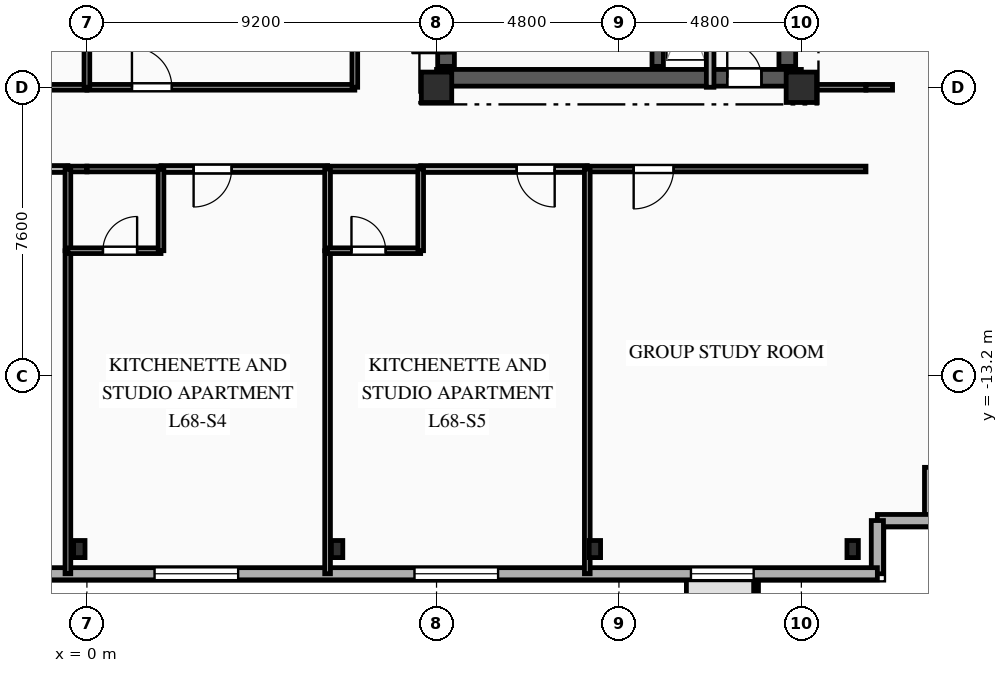
"""IFC4 building model, lengths in metres.
Left out: names, types, materials, properties, quantities, classifications, styles, units other than length and angle.
Written with IfcOpenShell. Run it as: python <this file> out.ifc"""

import sys

from ifc_helpers import new_model, si_unit, direction, frame, frame_2d, origin, origin_2d, place, context, subcontext, project, spatial, rectangle, i_section, extrude, element, fill, save


model = new_model("IFC4")
c1 = context("Model", 3, precision=1e-05, world=origin(), true_north=direction((0.0, 1.0)))
c2 = subcontext(c1, "Body", "Model", "MODEL_VIEW")
j1 = project(units=[si_unit("LENGTHUNIT", "METRE"), si_unit("PLANEANGLEUNIT", "RADIAN")], contexts=[c1])
p1 = place(None, origin())
s1 = spatial("IfcSite", under=j1, at=p1, CompositionType="ELEMENT")
p2 = place(p1, origin())
s2 = spatial("IfcBuilding", under=s1, at=p2, CompositionType="ELEMENT")
p3 = place(p2, frame((0.0, 0.0, 241.7)))
s3 = spatial("IfcBuildingStorey", under=s2, at=p3, CompositionType="ELEMENT", Elevation=241.7)
for number, where, z_axis, x_axis in (
    (1, (9.2, -5.6, 0.0), (0.0, 0.0, 1.0), (1.0, 0.0, 0.0)),
    (2, (18.8, -5.6, 0.0), (0.0, 0.0, 1.0), (1.0, 0.0, 0.0)),
):
    element("IfcColumn", number, at=place(p3, frame(where, z_axis=z_axis, x_axis=x_axis)), inside=s3, PredefinedType="COLUMN", context=c2, shape_type="SweptSolid", body=[
        extrude(rectangle(XDim=0.8, YDim=0.8, at=origin_2d()), origin(), (0.0, 0.0, 1.0), 3.35),
    ])
for number, where, z_axis, x_axis in (
    (3, (-0.2, -17.75, 0.0), (0.0, 0.0, 1.0), (1.0, 0.0, 0.0)),
    (4, (6.583, -17.75, 0.0), (0.0, 0.0, 1.0), (1.0, 0.0, 0.0)),
    (5, (13.367, -17.75, 0.0), (0.0, 0.0, 1.0), (1.0, 0.0, 0.0)),
    (6, (20.15, -17.75, 0.0), (0.0, 0.0, 1.0), (1.0, 0.0, 0.0)),
):
    element("IfcColumn", number, at=place(p3, frame(where, z_axis=z_axis, x_axis=x_axis)), inside=s3, PredefinedType="COLUMN", context=c2, shape_type="SweptSolid", body=[
        extrude(i_section(OverallWidth=0.3, OverallDepth=0.45, WebThickness=0.014, FlangeThickness=0.026, FilletRadius=0.027, at=origin_2d()), origin(), (0.0, 0.0, 1.0), 3.35),
    ])
for number, where, z_axis, x_axis in (
    (7, (22.2, -15.6, 0.0), (0.0, 0.0, 1.0), (0.0, -1.0, 0.0)),
    (8, (22.2, -17.0, 0.0), (0.0, 0.0, 1.0), (-1.0, 0.0, 0.0)),
    (9, (20.8, -17.0, 0.0), (0.0, 0.0, 1.0), (0.0, -1.0, 0.0)),
):
    element("IfcWall", number, at=place(p3, frame(where, z_axis=z_axis, x_axis=x_axis)), inside=s3, PredefinedType="SOLIDWALL", context=c2, shape_type="SweptSolid", body=[
        extrude(rectangle(XDim=1.4, YDim=0.32, at=frame_2d((0.7, 0.0))), origin(), (0.0, 0.0, 1.0), 3.04),
    ])
p4 = place(p3, frame((20.8, -18.4, 0.0), z_axis=(0.0, 0.0, 1.0), x_axis=(-1.0, 0.0, 0.0)))
e10 = element("IfcWall", 10, at=p4, inside=s3, PredefinedType="SOLIDWALL", context=c2, shape_type="SweptSolid", body=[
    extrude(rectangle(XDim=42.0, YDim=0.32, at=frame_2d((21.0, 0.0))), origin(), (0.0, 0.0, 1.0), 3.04),
])
p5 = place(p4, frame((3.255, 0.0, 0.85)))
e11 = element("IfcOpeningElement", 11, at=p5, cuts=e10, PredefinedType="OPENING", context=c2, shape_type="SweptSolid", body=[
    extrude(rectangle(XDim=1.65, YDim=1.85, at=frame_2d((0.825, 0.925))), frame((0.0, 0.17, 0.0), z_axis=(0.0, -1.0, 0.0), x_axis=(1.0, 0.0, 0.0)), (0.0, 0.0, 1.0), 0.34),
])
p6 = place(p4, frame((9.98, 0.0, 0.85)))
e12 = element("IfcOpeningElement", 12, at=p6, cuts=e10, PredefinedType="OPENING", context=c2, shape_type="SweptSolid", body=[
    extrude(rectangle(XDim=2.2, YDim=1.85, at=frame_2d((1.1, 0.925))), frame((0.0, 0.17, 0.0), z_axis=(0.0, -1.0, 0.0), x_axis=(1.0, 0.0, 0.0)), (0.0, 0.0, 1.0), 0.34),
])
p7 = place(p4, frame((16.82, 0.0, 0.85)))
e13 = element("IfcOpeningElement", 13, at=p7, cuts=e10, PredefinedType="OPENING", context=c2, shape_type="SweptSolid", body=[
    extrude(rectangle(XDim=2.2, YDim=1.85, at=frame_2d((1.1, 0.925))), frame((0.0, 0.17, 0.0), z_axis=(0.0, -1.0, 0.0), x_axis=(1.0, 0.0, 0.0)), (0.0, 0.0, 1.0), 0.34),
])
p8 = place(p4, frame((23.66, 0.0, 0.85)))
e14 = element("IfcOpeningElement", 14, at=p8, cuts=e10, PredefinedType="OPENING", context=c2, shape_type="SweptSolid", body=[
    extrude(rectangle(XDim=2.2, YDim=1.85, at=frame_2d((1.1, 0.925))), frame((0.0, 0.17, 0.0), z_axis=(0.0, -1.0, 0.0), x_axis=(1.0, 0.0, 0.0)), (0.0, 0.0, 1.0), 0.34),
])
p9 = place(p4, frame((30.5, 0.0, 0.85)))
e15 = element("IfcOpeningElement", 15, at=p9, cuts=e10, PredefinedType="OPENING", context=c2, shape_type="SweptSolid", body=[
    extrude(rectangle(XDim=2.2, YDim=1.85, at=frame_2d((1.1, 0.925))), frame((0.0, 0.17, 0.0), z_axis=(0.0, -1.0, 0.0), x_axis=(1.0, 0.0, 0.0)), (0.0, 0.0, 1.0), 0.34),
])
p10 = place(p4, frame((37.375, 0.0, 0.85)))
e16 = element("IfcOpeningElement", 16, at=p10, cuts=e10, PredefinedType="OPENING", context=c2, shape_type="SweptSolid", body=[
    extrude(rectangle(XDim=1.65, YDim=1.85, at=frame_2d((0.825, 0.925))), frame((0.0, 0.17, 0.0), z_axis=(0.0, -1.0, 0.0), x_axis=(1.0, 0.0, 0.0)), (0.0, 0.0, 1.0), 0.34),
])
p11 = place(p3, frame((9.2, -5.35, 0.0), z_axis=(0.0, 0.0, 1.0), x_axis=(1.0, 0.0, 0.0)))
e17 = element("IfcWall", 17, at=p11, inside=s3, PredefinedType="SHEAR", context=c2, shape_type="SweptSolid", body=[
    extrude(rectangle(XDim=9.6, YDim=0.44, at=frame_2d((4.8, 0.0))), origin(), (0.0, 0.0, 1.0), 3.04),
])
p12 = place(p11, frame((7.65, 0.0, 0.0)))
e18 = element("IfcOpeningElement", 18, at=p12, cuts=e17, PredefinedType="OPENING", context=c2, shape_type="SweptSolid", body=[
    extrude(rectangle(XDim=0.9, YDim=2.1, at=frame_2d((0.45, 1.05))), frame((0.0, 0.23, 0.0), z_axis=(0.0, -1.0, 0.0), x_axis=(1.0, 0.0, 0.0)), (0.0, 0.0, 1.0), 0.46),
])
p13 = place(p3, frame((9.45, -5.05, 0.0), z_axis=(0.0, 0.0, 1.0), x_axis=(0.0, 1.0, 0.0)))
e19 = element("IfcWall", 19, at=p13, inside=s3, PredefinedType="SHEAR", context=c2, shape_type="SweptSolid", body=[
    extrude(rectangle(XDim=10.1, YDim=0.44, at=frame_2d((5.05, 0.0))), origin(), (0.0, 0.0, 1.0), 3.04),
])
p14 = place(p13, frame((7.15, 0.0, 0.0)))
e20 = element("IfcOpeningElement", 20, at=p14, cuts=e19, PredefinedType="OPENING", context=c2, shape_type="SweptSolid", body=[
    extrude(rectangle(XDim=0.9, YDim=2.1, at=frame_2d((0.45, 1.05))), frame((0.0, 0.23, 0.0), z_axis=(0.0, -1.0, 0.0), x_axis=(1.0, 0.0, 0.0)), (0.0, 0.0, 1.0), 0.46),
])
p15 = place(p13, frame((2.4, 0.0, 0.0)))
e21 = element("IfcOpeningElement", 21, at=p15, cuts=e19, PredefinedType="OPENING", context=c2, shape_type="SweptSolid", body=[
    extrude(rectangle(XDim=1.2, YDim=2.15, at=frame_2d((0.6, 1.075))), frame((0.0, 0.23, 0.0), z_axis=(0.0, -1.0, 0.0), x_axis=(1.0, 0.0, 0.0)), (0.0, 0.0, 1.0), 0.46),
])
p16 = place(p13, frame((0.35, 0.0, 0.0)))
e22 = element("IfcOpeningElement", 22, at=p16, cuts=e19, PredefinedType="OPENING", context=c2, shape_type="SweptSolid", body=[
    extrude(rectangle(XDim=0.9, YDim=2.1, at=frame_2d((0.45, 1.05))), frame((0.0, 0.23, 0.0), z_axis=(0.0, -1.0, 0.0), x_axis=(1.0, 0.0, 0.0)), (0.0, 0.0, 1.0), 0.46),
])
p17 = place(p3, frame((18.43, -5.05, 0.0), z_axis=(0.0, 0.0, 1.0), x_axis=(0.0, 1.0, 0.0)))
e23 = element("IfcWall", 23, at=p17, inside=s3, PredefinedType="SHEAR", context=c2, shape_type="SweptSolid", body=[
    extrude(rectangle(XDim=10.1, YDim=0.44, at=frame_2d((5.05, 0.0))), origin(), (0.0, 0.0, 1.0), 3.04),
])
p18 = place(p3, frame((15.02, -5.05, 0.0), z_axis=(0.0, 0.0, 1.0), x_axis=(0.0, 1.0, 0.0)))
e24 = element("IfcWall", 24, at=p18, inside=s3, PredefinedType="SHEAR", context=c2, shape_type="SweptSolid", body=[
    extrude(rectangle(XDim=10.1, YDim=0.3, at=frame_2d((5.05, 0.0))), origin(), (0.0, 0.0, 1.0), 3.04),
])
p19 = place(p3, frame((16.4, -2.11, 0.0), z_axis=(0.0, 0.0, 1.0), x_axis=(0.0, -1.0, 0.0)))
e25 = element("IfcWall", 25, at=p19, inside=s3, PredefinedType="PARTITIONING", context=c2, shape_type="SweptSolid", body=[
    extrude(rectangle(XDim=3.49, YDim=0.2, at=frame_2d((1.745, 0.0))), origin(), (0.0, 0.0, 1.0), 3.04),
])
p20 = place(p3, frame((-0.5, -7.75, 0.0), z_axis=(0.0, 0.0, 1.0), x_axis=(-1.0, 0.0, 0.0)))
e26 = element("IfcWall", 26, at=p20, inside=s3, PredefinedType="PARTITIONING", context=c2, shape_type="SweptSolid", body=[
    extrude(rectangle(XDim=4.383, YDim=0.18, at=frame_2d((2.191, 0.0))), origin(), (0.0, 0.0, 1.0), 3.04),
])
p21 = place(p20, frame((0.858, 0.0, 0.0)))
e27 = element("IfcOpeningElement", 27, at=p21, cuts=e26, PredefinedType="OPENING", context=c2, shape_type="SweptSolid", body=[
    extrude(rectangle(XDim=1.0, YDim=2.15, at=frame_2d((0.5, 1.075))), frame((0.0, 0.1, 0.0), z_axis=(0.0, -1.0, 0.0), x_axis=(1.0, 0.0, 0.0)), (0.0, 0.0, 1.0), 0.2),
])
p22 = place(p3, frame((0.0, -7.75, 0.0), z_axis=(0.0, 0.0, 1.0), x_axis=(-1.0, 0.0, 0.0)))
e28 = element("IfcWall", 28, at=p22, inside=s3, PredefinedType="PLUMBINGWALL", context=c2, shape_type="SweptSolid", body=[
    extrude(rectangle(XDim=0.5, YDim=0.15, at=frame_2d((0.25, 0.0))), origin(), (0.0, 0.0, 1.0), 3.04),
])
p23 = place(p3, frame((-7.05, -5.6, 0.0), z_axis=(0.0, 0.0, 1.0), x_axis=(1.0, 0.0, 0.0)))
e29 = element("IfcWall", 29, at=p23, inside=s3, PredefinedType="PARTITIONING", context=c2, shape_type="SweptSolid", body=[
    extrude(rectangle(XDim=7.05, YDim=0.15, at=frame_2d((3.525, 0.0))), origin(), (0.0, 0.0, 1.0), 2.525),
])
p24 = place(p3, frame((18.8, -5.6, 0.0), z_axis=(0.0, 0.0, 1.0), x_axis=(1.0, 0.0, 0.0)))
e30 = element("IfcWall", 30, at=p24, inside=s3, PredefinedType="PARTITIONING", context=c2, shape_type="SweptSolid", body=[
    extrude(rectangle(XDim=1.7, YDim=0.15, at=frame_2d((0.85, 0.0))), origin(), (0.0, 0.0, 1.0), 3.04),
])
p25 = place(p3, frame((20.5, -5.6, 0.0), z_axis=(0.0, 0.0, 1.0), x_axis=(1.0, 0.0, 0.0)))
e31 = element("IfcWall", 31, at=p25, inside=s3, PredefinedType="PARTITIONING", context=c2, shape_type="SweptSolid", body=[
    extrude(rectangle(XDim=0.7, YDim=0.15, at=frame_2d((0.35, 0.0))), origin(), (0.0, 0.0, 1.0), 3.04),
])
p26 = place(p3, frame((6.333, -7.75, 0.0), z_axis=(0.0, 0.0, 1.0), x_axis=(-1.0, 0.0, 0.0)))
e32 = element("IfcWall", 32, at=p26, inside=s3, PredefinedType="PARTITIONING", context=c2, shape_type="SweptSolid", body=[
    extrude(rectangle(XDim=4.383, YDim=0.18, at=frame_2d((2.191, 0.0))), origin(), (0.0, 0.0, 1.0), 3.04),
])
p27 = place(p26, frame((2.525, 0.0, 0.0)))
e33 = element("IfcOpeningElement", 33, at=p27, cuts=e32, PredefinedType="OPENING", context=c2, shape_type="SweptSolid", body=[
    extrude(rectangle(XDim=1.0, YDim=2.15, at=frame_2d((0.5, 1.075))), frame((0.0, 0.1, 0.0), z_axis=(0.0, -1.0, 0.0), x_axis=(1.0, 0.0, 0.0)), (0.0, 0.0, 1.0), 0.2),
])
p28 = place(p3, frame((1.95, -7.75, 0.0), z_axis=(0.0, 0.0, 1.0), x_axis=(-1.0, 0.0, 0.0)))
e34 = element("IfcWall", 34, at=p28, inside=s3, PredefinedType="PLUMBINGWALL", context=c2, shape_type="SweptSolid", body=[
    extrude(rectangle(XDim=1.95, YDim=0.15, at=frame_2d((0.975, 0.0))), origin(), (0.0, 0.0, 1.0), 3.04),
])
p29 = place(p3, frame((13.167, -7.75, 0.0), z_axis=(0.0, 0.0, 1.0), x_axis=(-1.0, 0.0, 0.0)))
e35 = element("IfcWall", 35, at=p29, inside=s3, PredefinedType="PARTITIONING", context=c2, shape_type="SweptSolid", body=[
    extrude(rectangle(XDim=4.384, YDim=0.18, at=frame_2d((2.192, 0.0))), origin(), (0.0, 0.0, 1.0), 3.04),
])
p30 = place(p29, frame((0.858, 0.0, 0.0)))
e36 = element("IfcOpeningElement", 36, at=p30, cuts=e35, PredefinedType="OPENING", context=c2, shape_type="SweptSolid", body=[
    extrude(rectangle(XDim=1.0, YDim=2.15, at=frame_2d((0.5, 1.075))), frame((0.0, 0.1, 0.0), z_axis=(0.0, -1.0, 0.0), x_axis=(1.0, 0.0, 0.0)), (0.0, 0.0, 1.0), 0.2),
])
p31 = place(p3, frame((8.783, -7.75, 0.0), z_axis=(0.0, 0.0, 1.0), x_axis=(-1.0, 0.0, 0.0)))
e37 = element("IfcWall", 37, at=p31, inside=s3, PredefinedType="PLUMBINGWALL", context=c2, shape_type="SweptSolid", body=[
    extrude(rectangle(XDim=2.45, YDim=0.15, at=frame_2d((1.225, 0.0))), origin(), (0.0, 0.0, 1.0), 3.04),
])
p32 = place(p3, frame((20.5, -7.75, 0.0), z_axis=(0.0, 0.0, 1.0), x_axis=(-1.0, 0.0, 0.0)))
e38 = element("IfcWall", 38, at=p32, inside=s3, PredefinedType="PARTITIONING", context=c2, shape_type="SweptSolid", body=[
    extrude(rectangle(XDim=7.333, YDim=0.15, at=frame_2d((3.667, 0.0))), origin(), (0.0, 0.0, 1.0), 3.04),
])
p33 = place(p32, frame((5.062, 0.0, 0.0)))
e39 = element("IfcOpeningElement", 39, at=p33, cuts=e38, PredefinedType="OPENING", context=c2, shape_type="SweptSolid", body=[
    extrude(rectangle(XDim=1.05, YDim=2.15, at=frame_2d((0.525, 1.075))), frame((0.0, 0.085, 0.0), z_axis=(0.0, -1.0, 0.0), x_axis=(1.0, 0.0, 0.0)), (0.0, 0.0, 1.0), 0.17),
])
p34 = place(p3, frame((0.0, -5.6, 0.0), z_axis=(0.0, 0.0, 1.0), x_axis=(1.0, 0.0, 0.0)))
e40 = element("IfcWall", 40, at=p34, inside=s3, PredefinedType="PARTITIONING", context=c2, shape_type="SweptSolid", body=[
    extrude(rectangle(XDim=7.05, YDim=0.15, at=frame_2d((3.525, 0.0))), origin(), (0.0, 0.0, 1.0), 2.525),
])
p35 = place(p34, frame((1.185, 0.0, 0.0)))
e41 = element("IfcOpeningElement", 41, at=p35, cuts=e40, PredefinedType="OPENING", context=c2, shape_type="SweptSolid", body=[
    extrude(rectangle(XDim=1.05, YDim=2.15, at=frame_2d((0.525, 1.075))), frame((0.0, 0.085, 0.0), z_axis=(0.0, -1.0, 0.0), x_axis=(1.0, 0.0, 0.0)), (0.0, 0.0, 1.0), 0.17),
])
p36 = place(p3, frame((7.05, -5.6, 0.0), z_axis=(0.0, 0.0, 1.0), x_axis=(0.0, 1.0, 0.0)))
e42 = element("IfcWall", 42, at=p36, inside=s3, PredefinedType="PARTITIONING", context=c2, shape_type="SweptSolid", body=[
    extrude(rectangle(XDim=7.05, YDim=0.15, at=frame_2d((3.525, 0.0))), origin(), (0.0, 0.0, 1.0), 3.04),
])
p37 = place(p3, frame((-0.5, -9.9, 0.0), z_axis=(0.0, 0.0, 1.0), x_axis=(0.0, -1.0, 0.0)))
e43 = element("IfcWall", 43, at=p37, inside=s3, PredefinedType="PARTITIONING", context=c2, shape_type="SweptSolid", body=[
    extrude(rectangle(XDim=8.5, YDim=0.15, at=frame_2d((4.25, 0.0))), origin(), (0.0, 0.0, 1.0), 3.04),
])
p38 = place(p3, frame((-0.5, -7.75, 0.0), z_axis=(0.0, 0.0, 1.0), x_axis=(0.0, -1.0, 0.0)))
e44 = element("IfcWall", 44, at=p38, inside=s3, PredefinedType="PLUMBINGWALL", context=c2, shape_type="SweptSolid", body=[
    extrude(rectangle(XDim=2.15, YDim=0.15, at=frame_2d((1.075, 0.0))), origin(), (0.0, 0.0, 1.0), 3.04),
])
p39 = place(p3, frame((-0.5, -9.9, 0.0), z_axis=(0.0, 0.0, 1.0), x_axis=(1.0, 0.0, 0.0)))
e45 = element("IfcWall", 45, at=p39, inside=s3, PredefinedType="PLUMBINGWALL", context=c2, shape_type="SweptSolid", body=[
    extrude(rectangle(XDim=2.45, YDim=0.15, at=frame_2d((1.225, 0.0))), origin(), (0.0, 0.0, 1.0), 3.04),
])
p40 = place(p39, frame((0.921, 0.0, 0.0)))
e46 = element("IfcOpeningElement", 46, at=p40, cuts=e45, PredefinedType="OPENING", context=c2, shape_type="SweptSolid", body=[
    extrude(rectangle(XDim=0.9, YDim=2.1, at=frame_2d((0.45, 1.05))), frame((0.0, 0.085, 0.0), z_axis=(0.0, -1.0, 0.0), x_axis=(1.0, 0.0, 0.0)), (0.0, 0.0, 1.0), 0.17),
])
p41 = place(p3, frame((1.95, -9.9, 0.0), z_axis=(0.0, 0.0, 1.0), x_axis=(0.0, 1.0, 0.0)))
e47 = element("IfcWall", 47, at=p41, inside=s3, PredefinedType="PLUMBINGWALL", context=c2, shape_type="SweptSolid", body=[
    extrude(rectangle(XDim=2.15, YDim=0.15, at=frame_2d((1.075, 0.0))), origin(), (0.0, 0.0, 1.0), 3.04),
])
p42 = place(p3, frame((6.333, -9.9, 0.0), z_axis=(0.0, 0.0, 1.0), x_axis=(0.0, -1.0, 0.0)))
e48 = element("IfcWall", 48, at=p42, inside=s3, PredefinedType="PARTITIONING", context=c2, shape_type="SweptSolid", body=[
    extrude(rectangle(XDim=8.5, YDim=0.15, at=frame_2d((4.25, 0.0))), origin(), (0.0, 0.0, 1.0), 3.04),
])
p43 = place(p3, frame((6.333, -7.75, 0.0), z_axis=(0.0, 0.0, 1.0), x_axis=(0.0, -1.0, 0.0)))
e49 = element("IfcWall", 49, at=p43, inside=s3, PredefinedType="PLUMBINGWALL", context=c2, shape_type="SweptSolid", body=[
    extrude(rectangle(XDim=2.15, YDim=0.15, at=frame_2d((1.075, 0.0))), origin(), (0.0, 0.0, 1.0), 3.04),
])
p44 = place(p3, frame((6.333, -9.9, 0.0), z_axis=(0.0, 0.0, 1.0), x_axis=(1.0, 0.0, 0.0)))
e50 = element("IfcWall", 50, at=p44, inside=s3, PredefinedType="PLUMBINGWALL", context=c2, shape_type="SweptSolid", body=[
    extrude(rectangle(XDim=2.45, YDim=0.15, at=frame_2d((1.225, 0.0))), origin(), (0.0, 0.0, 1.0), 3.04),
])
p45 = place(p44, frame((0.629, 0.0, 0.0)))
e51 = element("IfcOpeningElement", 51, at=p45, cuts=e50, PredefinedType="OPENING", context=c2, shape_type="SweptSolid", body=[
    extrude(rectangle(XDim=0.9, YDim=2.1, at=frame_2d((0.45, 1.05))), frame((0.0, 0.085, 0.0), z_axis=(0.0, -1.0, 0.0), x_axis=(1.0, 0.0, 0.0)), (0.0, 0.0, 1.0), 0.17),
])
p46 = place(p3, frame((8.783, -9.9, 0.0), z_axis=(0.0, 0.0, 1.0), x_axis=(0.0, 1.0, 0.0)))
e52 = element("IfcWall", 52, at=p46, inside=s3, PredefinedType="PLUMBINGWALL", context=c2, shape_type="SweptSolid", body=[
    extrude(rectangle(XDim=2.15, YDim=0.15, at=frame_2d((1.075, 0.0))), origin(), (0.0, 0.0, 1.0), 2.665),
])
p47 = place(p3, frame((13.167, -7.75, 0.0), z_axis=(0.0, 0.0, 1.0), x_axis=(0.0, -1.0, 0.0)))
e53 = element("IfcWall", 53, at=p47, inside=s3, PredefinedType="PARTITIONING", context=c2, shape_type="SweptSolid", body=[
    extrude(rectangle(XDim=10.65, YDim=0.15, at=frame_2d((5.325, 0.0))), origin(), (0.0, 0.0, 1.0), 3.04),
])
p48 = place(p3, frame((0.0, 1.45, 0.0), z_axis=(0.0, 0.0, 1.0), x_axis=(0.0, -1.0, 0.0)))
e54 = element("IfcWall", 54, at=p48, inside=s3, PredefinedType="PARTITIONING", context=c2, shape_type="SweptSolid", body=[
    extrude(rectangle(XDim=7.05, YDim=0.15, at=frame_2d((3.525, 0.0))), origin(), (0.0, 0.0, 1.0), 3.04),
])
p49 = place(p5, origin())
e55 = element("IfcWindow", 55, at=p49, inside=s3, PartitioningType="SINGLE_PANEL", PredefinedType="WINDOW", context=c2, shape_type="SweptSolid", body=[
    extrude(rectangle(XDim=1.65, YDim=1.85, at=frame_2d((0.825, 0.925))), frame((0.0, 0.03, 0.0), z_axis=(0.0, -1.0, 0.0), x_axis=(1.0, 0.0, 0.0)), (0.0, 0.0, 1.0), 0.06),
])
fill(e11, e55)
p50 = place(p6, origin())
e56 = element("IfcWindow", 56, at=p50, inside=s3, PartitioningType="SINGLE_PANEL", PredefinedType="WINDOW", context=c2, shape_type="SweptSolid", body=[
    extrude(rectangle(XDim=2.2, YDim=1.85, at=frame_2d((1.1, 0.925))), frame((0.0, 0.03, 0.0), z_axis=(0.0, -1.0, 0.0), x_axis=(1.0, 0.0, 0.0)), (0.0, 0.0, 1.0), 0.06),
])
fill(e12, e56)
p51 = place(p7, origin())
e57 = element("IfcWindow", 57, at=p51, inside=s3, PartitioningType="SINGLE_PANEL", PredefinedType="WINDOW", context=c2, shape_type="SweptSolid", body=[
    extrude(rectangle(XDim=2.2, YDim=1.85, at=frame_2d((1.1, 0.925))), frame((0.0, 0.03, 0.0), z_axis=(0.0, -1.0, 0.0), x_axis=(1.0, 0.0, 0.0)), (0.0, 0.0, 1.0), 0.06),
])
fill(e13, e57)
p52 = place(p12, origin())
e58 = element("IfcDoor", 58, at=p52, inside=s3, OperationType="SINGLE_SWING_LEFT", PredefinedType="DOOR", context=c2, shape_type="SweptSolid", body=[
    extrude(rectangle(XDim=0.9, YDim=2.1, at=frame_2d((0.45, 1.05))), frame((0.0, 0.025, 0.0), z_axis=(0.0, -1.0, 0.0), x_axis=(1.0, 0.0, 0.0)), (0.0, 0.0, 1.0), 0.05),
])
fill(e18, e58)
p53 = place(p16, origin())
e59 = element("IfcDoor", 59, at=p53, inside=s3, OperationType="SINGLE_SWING_LEFT", PredefinedType="DOOR", context=c2, shape_type="SweptSolid", body=[
    extrude(rectangle(XDim=0.9, YDim=2.1, at=frame_2d((0.45, 1.05))), frame((0.0, 0.025, 0.0), z_axis=(0.0, -1.0, 0.0), x_axis=(1.0, 0.0, 0.0)), (0.0, 0.0, 1.0), 0.05),
])
fill(e22, e59)
p54 = place(p27, origin())
e60 = element("IfcDoor", 60, at=p54, inside=s3, OperationType="SINGLE_SWING_RIGHT", PredefinedType="DOOR", context=c2, shape_type="SweptSolid", body=[
    extrude(rectangle(XDim=1.0, YDim=2.15, at=frame_2d((0.5, 1.075))), frame((0.0, 0.025, 0.0), z_axis=(0.0, -1.0, 0.0), x_axis=(1.0, 0.0, 0.0)), (0.0, 0.0, 1.0), 0.05),
])
fill(e33, e60)
p55 = place(p30, origin())
e61 = element("IfcDoor", 61, at=p55, inside=s3, OperationType="SINGLE_SWING_LEFT", PredefinedType="DOOR", context=c2, shape_type="SweptSolid", body=[
    extrude(rectangle(XDim=1.0, YDim=2.15, at=frame_2d((0.5, 1.075))), frame((0.0, 0.025, 0.0), z_axis=(0.0, -1.0, 0.0), x_axis=(1.0, 0.0, 0.0)), (0.0, 0.0, 1.0), 0.05),
])
fill(e36, e61)
p56 = place(p33, origin())
e62 = element("IfcDoor", 62, at=p56, inside=s3, OperationType="SINGLE_SWING_RIGHT", PredefinedType="DOOR", context=c2, shape_type="SweptSolid", body=[
    extrude(rectangle(XDim=1.05, YDim=2.15, at=frame_2d((0.525, 1.075))), frame((0.0, 0.025, 0.0), z_axis=(0.0, -1.0, 0.0), x_axis=(1.0, 0.0, 0.0)), (0.0, 0.0, 1.0), 0.05),
])
fill(e39, e62)
p57 = place(p35, origin())
e63 = element("IfcDoor", 63, at=p57, inside=s3, OperationType="SINGLE_SWING_LEFT", PredefinedType="DOOR", context=c2, shape_type="SweptSolid", body=[
    extrude(rectangle(XDim=1.05, YDim=2.15, at=frame_2d((0.525, 1.075))), frame((0.0, 0.025, 0.0), z_axis=(0.0, -1.0, 0.0), x_axis=(1.0, 0.0, 0.0)), (0.0, 0.0, 1.0), 0.05),
])
fill(e41, e63)
p58 = place(p40, origin())
e64 = element("IfcDoor", 64, at=p58, inside=s3, OperationType="SINGLE_SWING_RIGHT", PredefinedType="DOOR", context=c2, shape_type="SweptSolid", body=[
    extrude(rectangle(XDim=0.9, YDim=2.1, at=frame_2d((0.45, 1.05))), frame((0.0, 0.025, 0.0), z_axis=(0.0, -1.0, 0.0), x_axis=(1.0, 0.0, 0.0)), (0.0, 0.0, 1.0), 0.05),
])
fill(e46, e64)
p59 = place(p45, origin())
e65 = element("IfcDoor", 65, at=p59, inside=s3, OperationType="SINGLE_SWING_LEFT", PredefinedType="DOOR", context=c2, shape_type="SweptSolid", body=[
    extrude(rectangle(XDim=0.9, YDim=2.1, at=frame_2d((0.45, 1.05))), frame((0.0, 0.025, 0.0), z_axis=(0.0, -1.0, 0.0), x_axis=(1.0, 0.0, 0.0)), (0.0, 0.0, 1.0), 0.05),
])
fill(e51, e65)
save(model, sys.argv[1])
